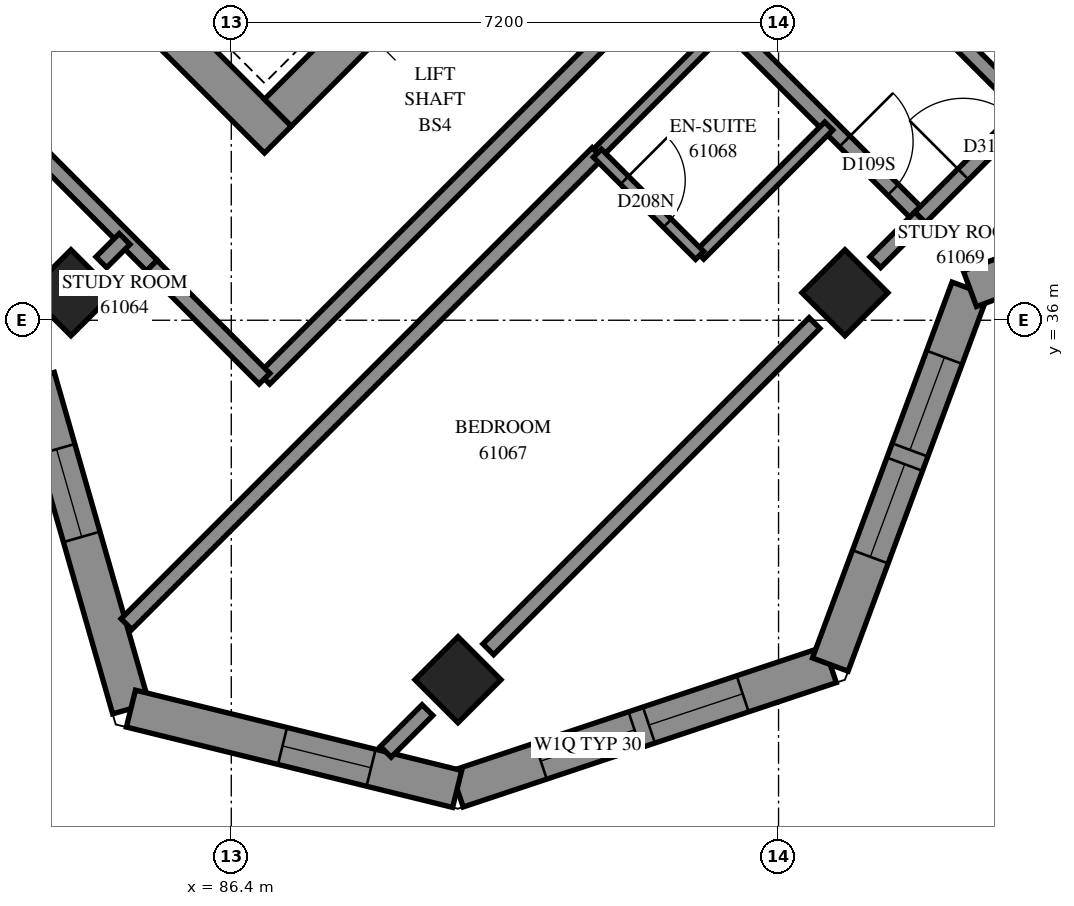
"""IFC4 building model, lengths in metres.
Left out: names, types, materials, properties, quantities, classifications, styles, units other than length and angle.
Written with IfcOpenShell. Run it as: python <this file> out.ifc"""

import sys

from ifc_helpers import new_model, si_unit, direction, frame, frame_2d, origin, origin_2d, place, context, subcontext, project, spatial, polyline, rectangle, outline, extrude, element, fill, save


model = new_model("IFC4")
c1 = context("Model", 3, precision=1e-05, world=origin(), true_north=direction((0.0, 1.0)))
c2 = subcontext(c1, "Body", "Model", "MODEL_VIEW")
j1 = project(units=[si_unit("LENGTHUNIT", "METRE"), si_unit("PLANEANGLEUNIT", "RADIAN")], contexts=[c1])
p1 = place(None, origin())
s1 = spatial("IfcSite", under=j1, at=p1, CompositionType="ELEMENT")
p2 = place(p1, origin())
s2 = spatial("IfcBuilding", under=s1, at=p2, CompositionType="ELEMENT")
p3 = place(p2, frame((0.0, 0.0, 223.6)))
s3 = spatial("IfcBuildingStorey", under=s2, at=p3, CompositionType="ELEMENT", Elevation=223.6)
for number, where, z_axis, x_axis in (
    (1, (84.291, 36.362, 0.0), (0.0, 0.0, 1.0), (0.707, -0.707, 0.0)),
    (2, (94.474, 36.362, 0.0), (0.0, 0.0, 1.0), (0.707, -0.707, 0.0)),
    (3, (89.382, 31.271, 0.0), (0.0, 0.0, 1.0), (0.707, -0.707, 0.0)),
):
    element("IfcColumn", number, at=place(p3, frame(where, z_axis=z_axis, x_axis=x_axis)), inside=s3, PredefinedType="COLUMN", context=c2, shape_type="SweptSolid", body=[
        extrude(rectangle(XDim=0.8, YDim=0.8, at=origin_2d()), origin(), (0.0, 0.0, 1.0), 3.1),
    ])
p4 = place(p3, frame((76.124, 49.267, -0.3), z_axis=(0.0, 0.0, 1.0), x_axis=(0.7071067812, -0.7071067812, 0.0)))
e4 = element("IfcWall", 4, at=p4, inside=s3, PredefinedType="SHEAR", context=c2, shape_type="SweptSolid", body=[
    extrude(rectangle(XDim=15.4, YDim=0.5, at=frame_2d((7.7, 0.0))), origin(), (0.0, 0.0, 1.0), 2.7),
])
p5 = place(p3, frame((87.013, 38.731, -0.3), z_axis=(0.0, 0.0, 1.0), x_axis=(0.7071067812, 0.7071067812, 0.0)))
e5 = element("IfcWall", 5, at=p5, inside=s3, PredefinedType="SHEAR", context=c2, shape_type="SweptSolid", body=[
    extrude(rectangle(XDim=14.4, YDim=0.5, at=frame_2d((7.2, 0.0))), origin(), (0.0, 0.0, 1.0), 2.7),
])
p6 = place(p5, frame((4.55, 0.0, 0.3)))
e6 = element("IfcOpeningElement", 6, at=p6, cuts=e5, PredefinedType="OPENING", context=c2, shape_type="SweptSolid", body=[
    extrude(rectangle(XDim=1.1, YDim=2.1, at=frame_2d((0.55, 1.05))), frame((0.0, 0.26, 0.0), z_axis=(0.0, -1.0, 0.0), x_axis=(1.0, 0.0, 0.0)), (0.0, 0.0, 1.0), 0.52),
])
p7 = place(p5, frame((11.35, 0.0, 0.3)))
e7 = element("IfcOpeningElement", 7, at=p7, cuts=e5, PredefinedType="OPENING", context=c2, shape_type="SweptSolid", body=[
    extrude(rectangle(XDim=1.1, YDim=2.1, at=frame_2d((0.55, 1.05))), frame((0.0, 0.26, 0.0), z_axis=(0.0, -1.0, 0.0), x_axis=(1.0, 0.0, 0.0)), (0.0, 0.0, 1.0), 0.52),
])
p8 = place(p3, frame((89.372, 29.834, 0.0), z_axis=(0.0, 0.0, 1.0), x_axis=(0.9486832981, 0.316227766, 0.0)))
e8 = element("IfcWall", 8, at=p8, inside=s3, PredefinedType="SOLIDWALL", context=c2, shape_type="SweptSolid", body=[
    extrude(outline(polyline([(-0.072, -0.25), (5.294, -0.25), (5.055, 0.25), (0.072, 0.25), (-0.072, -0.25)])), origin(), (0.0, 0.0, 1.0), 3.1),
])
p9 = place(p8, frame((1.159, 0.0, 0.45)))
e9 = element("IfcOpeningElement", 9, at=p9, cuts=e8, PredefinedType="OPENING", context=c2, shape_type="SweptSolid", body=[
    extrude(rectangle(XDim=1.3, YDim=2.5, at=frame_2d((0.65, 1.25))), frame((0.0, 0.26, 0.0), z_axis=(0.0, -1.0, 0.0), x_axis=(1.0, 0.0, 0.0)), (0.0, 0.0, 1.0), 0.52),
])
p10 = place(p8, frame((2.659, 0.0, 0.45)))
e10 = element("IfcOpeningElement", 10, at=p10, cuts=e8, PredefinedType="OPENING", context=c2, shape_type="SweptSolid", body=[
    extrude(rectangle(XDim=1.3, YDim=2.5, at=frame_2d((0.65, 1.25))), frame((0.0, 0.26, 0.0), z_axis=(0.0, -1.0, 0.0), x_axis=(1.0, 0.0, 0.0)), (0.0, 0.0, 1.0), 0.52),
])
p11 = place(p3, frame((94.281, 31.47, 0.0), z_axis=(0.0, 0.0, 1.0), x_axis=(0.3481903374, 0.9374238577, 0.0)))
e11 = element("IfcWall", 11, at=p11, inside=s3, PredefinedType="SOLIDWALL", context=c2, shape_type="SweptSolid", body=[
    extrude(outline(polyline([(-0.12, -0.25), (5.16, -0.25), (5.39, 0.25), (0.12, 0.25), (-0.12, -0.25)])), origin(), (0.0, 0.0, 1.0), 3.1),
])
p12 = place(p11, frame((1.512, 0.0, 0.45)))
e12 = element("IfcOpeningElement", 12, at=p12, cuts=e11, PredefinedType="OPENING", context=c2, shape_type="SweptSolid", body=[
    extrude(rectangle(XDim=1.3, YDim=2.5, at=frame_2d((0.65, 1.25))), frame((0.0, 0.26, 0.0), z_axis=(0.0, -1.0, 0.0), x_axis=(1.0, 0.0, 0.0)), (0.0, 0.0, 1.0), 0.52),
])
p13 = place(p11, frame((3.012, 0.0, 0.45)))
e13 = element("IfcOpeningElement", 13, at=p13, cuts=e11, PredefinedType="OPENING", context=c2, shape_type="SweptSolid", body=[
    extrude(rectangle(XDim=1.3, YDim=2.5, at=frame_2d((0.65, 1.25))), frame((0.0, 0.26, 0.0), z_axis=(0.0, -1.0, 0.0), x_axis=(1.0, 0.0, 0.0)), (0.0, 0.0, 1.0), 0.52),
])
p14 = place(p3, frame((96.118, 36.415, 0.0), z_axis=(0.0, 0.0, 1.0), x_axis=(0.9374238577, 0.3481903374, 0.0)))
e14 = element("IfcWall", 14, at=p14, inside=s3, PredefinedType="SOLIDWALL", context=c2, shape_type="SweptSolid", body=[
    extrude(outline(polyline([(0.115, -0.25), (5.395, -0.25), (5.155, 0.25), (-0.115, 0.25), (0.115, -0.25)])), origin(), (0.0, 0.0, 1.0), 3.1),
])
p15 = place(p14, frame((1.655, 0.0, 0.45)))
e15 = element("IfcOpeningElement", 15, at=p15, cuts=e14, PredefinedType="OPENING", context=c2, shape_type="SweptSolid", body=[
    extrude(rectangle(XDim=1.3, YDim=2.5, at=frame_2d((0.65, 1.25))), frame((0.0, 0.26, 0.0), z_axis=(0.0, -1.0, 0.0), x_axis=(1.0, 0.0, 0.0)), (0.0, 0.0, 1.0), 0.52),
])
p16 = place(p14, frame((3.155, 0.0, 0.45)))
e16 = element("IfcOpeningElement", 16, at=p16, cuts=e14, PredefinedType="OPENING", context=c2, shape_type="SweptSolid", body=[
    extrude(rectangle(XDim=1.3, YDim=2.5, at=frame_2d((0.65, 1.25))), frame((0.0, 0.26, 0.0), z_axis=(0.0, -1.0, 0.0), x_axis=(1.0, 0.0, 0.0)), (0.0, 0.0, 1.0), 0.52),
])
p17 = place(p3, frame((83.831, 35.246, 0.0), z_axis=(0.0, 0.0, 1.0), x_axis=(0.2755517971, -0.9612862254, 0.0)))
e17 = element("IfcWall", 17, at=p17, inside=s3, PredefinedType="SOLIDWALL", context=c2, shape_type="SweptSolid", body=[
    extrude(outline(polyline([(0.139, -0.25), (4.676, -0.25), (4.386, 0.25), (-0.139, 0.25), (0.139, -0.25)])), origin(), (0.0, 0.0, 1.0), 3.1),
])
p18 = place(p17, frame((0.98, 0.0, 0.45)))
e18 = element("IfcOpeningElement", 18, at=p18, cuts=e17, PredefinedType="OPENING", context=c2, shape_type="SweptSolid", body=[
    extrude(rectangle(XDim=1.2, YDim=2.5, at=frame_2d((0.6, 1.25))), frame((0.0, 0.26, 0.0), z_axis=(0.0, -1.0, 0.0), x_axis=(1.0, 0.0, 0.0)), (0.0, 0.0, 1.0), 0.52),
])
p19 = place(p3, frame((85.08, 30.89, 0.0), z_axis=(0.0, 0.0, 1.0), x_axis=(0.9709947618, -0.2391007581, 0.0)))
e19 = element("IfcWall", 19, at=p19, inside=s3, PredefinedType="SOLIDWALL", context=c2, shape_type="SweptSolid", body=[
    extrude(outline(polyline([(-0.145, -0.25), (4.493, -0.25), (4.348, 0.25), (0.145, 0.25), (-0.145, -0.25)])), origin(), (0.0, 0.0, 1.0), 3.1),
])
p20 = place(p19, frame((2.054, 0.0, 0.45)))
e20 = element("IfcOpeningElement", 20, at=p20, cuts=e19, PredefinedType="OPENING", context=c2, shape_type="SweptSolid", body=[
    extrude(rectangle(XDim=1.2, YDim=2.5, at=frame_2d((0.6, 1.25))), frame((0.0, 0.26, 0.0), z_axis=(0.0, -1.0, 0.0), x_axis=(1.0, 0.0, 0.0)), (0.0, 0.0, 1.0), 0.52),
])
p21 = place(p3, frame((85.021, 32.002, 0.0), z_axis=(0.0, 0.0, 1.0), x_axis=(0.7071010771, 0.7071124852, 0.0)))
e21 = element("IfcWall", 21, at=p21, inside=s3, PredefinedType="PARTITIONING", context=c2, shape_type="SweptSolid", body=[
    extrude(rectangle(XDim=8.766, YDim=0.2, at=frame_2d((4.383, 0.0))), origin(), (0.0, 0.0, 1.0), 3.1),
])
p22 = place(p3, frame((86.835, 35.231, 0.0), z_axis=(0.0, 0.0, 1.0), x_axis=(0.7071067812, 0.7071067812, 0.0)))
e22 = element("IfcWall", 22, at=p22, inside=s3, PredefinedType="PARTITIONING", context=c2, shape_type="SweptSolid", body=[
    extrude(rectangle(XDim=7.6, YDim=0.2, at=frame_2d((3.8, 0.0))), origin(), (0.0, 0.0, 1.0), 3.1),
])
p23 = place(p22, frame((6.346, 0.0, 0.0)))
e23 = element("IfcOpeningElement", 23, at=p23, cuts=e22, PredefinedType="OPENING", context=c2, shape_type="SweptSolid", body=[
    extrude(rectangle(XDim=1.0, YDim=2.1, at=frame_2d((0.5, 1.05))), frame((0.0, 0.11, 0.0), z_axis=(0.0, -1.0, 0.0), x_axis=(1.0, 0.0, 0.0)), (0.0, 0.0, 1.0), 0.22),
])
p24 = place(p3, frame((80.522, 41.553, 0.0), z_axis=(0.0, 0.0, 1.0), x_axis=(0.7071067812, -0.7071067812, 0.0)))
e24 = element("IfcWall", 24, at=p24, inside=s3, PredefinedType="PARTITIONING", context=c2, shape_type="SweptSolid", body=[
    extrude(rectangle(XDim=6.836, YDim=0.2, at=frame_2d((3.418, 0.0))), origin(), (0.0, 0.0, 1.0), 3.1),
])
p25 = place(p3, frame((89.781, 31.671, 0.0), z_axis=(0.0, 0.0, 1.0), x_axis=(0.7071067812, 0.7071067812, 0.0)))
e25 = element("IfcWall", 25, at=p25, inside=s3, PredefinedType="PARTITIONING", context=c2, shape_type="SweptSolid", body=[
    extrude(rectangle(XDim=6.07, YDim=0.2, at=frame_2d((3.035, 0.0))), origin(), (0.0, 0.0, 1.0), 2.6),
])
p26 = place(p3, frame((93.623, 42.015, 0.0), z_axis=(0.0, 0.0, 1.0), x_axis=(0.7071067812, -0.7071067812, 0.0)))
e26 = element("IfcWall", 26, at=p26, inside=s3, PredefinedType="PARTITIONING", context=c2, shape_type="SweptSolid", body=[
    extrude(rectangle(XDim=4.599, YDim=0.2, at=frame_2d((2.3, 0.0))), origin(), (0.0, 0.0, 1.0), 3.1),
])
p27 = place(p26, frame((1.349, 0.0, 0.0)))
e27 = element("IfcOpeningElement", 27, at=p27, cuts=e26, PredefinedType="OPENING", context=c2, shape_type="SweptSolid", body=[
    extrude(rectangle(XDim=0.9, YDim=2.1, at=frame_2d((0.45, 1.05))), frame((0.0, 0.11, 0.0), z_axis=(0.0, -1.0, 0.0), x_axis=(1.0, 0.0, 0.0)), (0.0, 0.0, 1.0), 0.22),
])
p28 = place(p3, frame((92.216, 40.608, 0.0), z_axis=(0.0, 0.0, 1.0), x_axis=(0.7071067812, -0.7071067812, 0.0)))
e28 = element("IfcWall", 28, at=p28, inside=s3, PredefinedType="PARTITIONING", context=c2, shape_type="SweptSolid", body=[
    extrude(rectangle(XDim=4.599, YDim=0.2, at=frame_2d((2.3, 0.0))), origin(), (0.0, 0.0, 1.0), 3.1),
])
p29 = place(p28, frame((3.189, 0.0, 0.0)))
e29 = element("IfcOpeningElement", 29, at=p29, cuts=e28, PredefinedType="OPENING", context=c2, shape_type="SweptSolid", body=[
    extrude(rectangle(XDim=0.9, YDim=2.1, at=frame_2d((0.45, 1.05))), frame((0.0, 0.11, 0.0), z_axis=(0.0, -1.0, 0.0), x_axis=(1.0, 0.0, 0.0)), (0.0, 0.0, 1.0), 0.22),
])
for number, where, z_axis, x_axis in (
    (30, (92.563, 36.857, 0.0), (0.0, 0.0, 1.0), (0.707, 0.707, 0.0)),
    (31, (91.219, 38.201, 0.0), (0.0, 0.0, 1.0), (0.707, 0.707, 0.0)),
):
    element("IfcWall", number, at=place(p3, frame(where, z_axis=z_axis, x_axis=x_axis)), inside=s3, PredefinedType="PARTITIONING", context=c2, shape_type="SweptSolid", body=[
        extrude(rectangle(XDim=2.401, YDim=0.15, at=frame_2d((1.201, 0.0))), origin(), (0.0, 0.0, 1.0), 3.1),
    ])
p30 = place(p3, frame((85.353, 36.717, 0.0), z_axis=(0.0, 0.0, 1.0), x_axis=(0.7066304548, -0.7075827869, 0.0)))
e32 = element("IfcWall", 32, at=p30, inside=s3, PredefinedType="PARTITIONING", context=c2, shape_type="SweptSolid", body=[
    extrude(rectangle(XDim=2.1, YDim=0.2, at=frame_2d((1.05, 0.0))), origin(), (0.0, 0.0, 1.0), 3.1),
])
p31 = place(p3, frame((95.463, 37.353, 0.0), z_axis=(0.0, 0.0, 1.0), x_axis=(0.7071067812, 0.7071067812, 0.0)))
e33 = element("IfcWall", 33, at=p31, inside=s3, PredefinedType="PARTITIONING", context=c2, shape_type="SweptSolid", body=[
    extrude(rectangle(XDim=2.0, YDim=0.2, at=frame_2d((1.0, 0.0))), origin(), (0.0, 0.0, 1.0), 2.6),
])
p32 = place(p31, frame((0.802, 0.0, 0.0)))
e34 = element("IfcOpeningElement", 34, at=p32, cuts=e33, PredefinedType="OPENING", context=c2, shape_type="SweptSolid", body=[
    extrude(rectangle(XDim=1.0, YDim=2.1, at=frame_2d((0.5, 1.05))), frame((0.0, 0.11, 0.0), z_axis=(0.0, -1.0, 0.0), x_axis=(1.0, 0.0, 0.0)), (0.0, 0.0, 1.0), 0.22),
])
p33 = place(p3, frame((91.217, 38.197, 0.0), z_axis=(0.0, 0.0, 1.0), x_axis=(0.7071067812, -0.7071067812, 0.0)))
e35 = element("IfcWall", 35, at=p33, inside=s3, PredefinedType="PARTITIONING", context=c2, shape_type="SweptSolid", body=[
    extrude(rectangle(XDim=1.901, YDim=0.15, at=frame_2d((0.95, 0.0))), origin(), (0.0, 0.0, 1.0), 3.1),
])
p34 = place(p33, frame((0.502, 0.0, 0.0)))
e36 = element("IfcOpeningElement", 36, at=p34, cuts=e35, PredefinedType="OPENING", context=c2, shape_type="SweptSolid", body=[
    extrude(rectangle(XDim=0.8, YDim=2.1, at=frame_2d((0.4, 1.05))), frame((0.0, 0.085, 0.0), z_axis=(0.0, -1.0, 0.0), x_axis=(1.0, 0.0, 0.0)), (0.0, 0.0, 1.0), 0.17),
])
p35 = place(p3, frame((94.873, 36.763, 0.0), z_axis=(0.0, 0.0, 1.0), x_axis=(0.7071067812, 0.7071067812, 0.0)))
e37 = element("IfcWall", 37, at=p35, inside=s3, PredefinedType="PARTITIONING", context=c2, shape_type="SweptSolid", body=[
    extrude(rectangle(XDim=0.834, YDim=0.2, at=frame_2d((0.417, 0.0))), origin(), (0.0, 0.0, 1.0), 2.6),
])
p36 = place(p3, frame((88.433, 30.322, 0.0), z_axis=(0.0, 0.0, 1.0), x_axis=(0.7070423259, 0.7071712306, 0.0)))
e38 = element("IfcWall", 38, at=p36, inside=s3, PredefinedType="PARTITIONING", context=c2, shape_type="SweptSolid", body=[
    extrude(rectangle(XDim=0.776, YDim=0.2, at=frame_2d((0.388, 0.0))), origin(), (0.0, 0.0, 1.0), 3.1),
])
p37 = place(p3, frame((84.691, 36.763, 0.0), z_axis=(0.0, 0.0, 1.0), x_axis=(0.7071067812, 0.7071067812, 0.0)))
e39 = element("IfcWall", 39, at=p37, inside=s3, PredefinedType="PARTITIONING", context=c2, shape_type="SweptSolid", body=[
    extrude(rectangle(XDim=0.433, YDim=0.2, at=frame_2d((0.216, 0.0))), origin(), (0.0, 0.0, 1.0), 3.1),
])
p38 = place(p9, origin())
e40 = element("IfcWindow", 40, at=p38, inside=s3, PartitioningType="SINGLE_PANEL", PredefinedType="WINDOW", context=c2, shape_type="SweptSolid", body=[
    extrude(rectangle(XDim=1.3, YDim=2.5, at=frame_2d((0.65, 1.25))), frame((0.0, 0.18, 0.0), z_axis=(0.0, -1.0, 0.0), x_axis=(1.0, 0.0, 0.0)), (0.0, 0.0, 1.0), 0.06),
])
fill(e9, e40)
p39 = place(p10, origin())
e41 = element("IfcWindow", 41, at=p39, inside=s3, PartitioningType="SINGLE_PANEL", PredefinedType="WINDOW", context=c2, shape_type="SweptSolid", body=[
    extrude(rectangle(XDim=1.3, YDim=2.5, at=frame_2d((0.65, 1.25))), frame((0.0, 0.18, 0.0), z_axis=(0.0, -1.0, 0.0), x_axis=(1.0, 0.0, 0.0)), (0.0, 0.0, 1.0), 0.06),
])
fill(e10, e41)
p40 = place(p12, origin())
e42 = element("IfcWindow", 42, at=p40, inside=s3, PartitioningType="SINGLE_PANEL", PredefinedType="WINDOW", context=c2, shape_type="SweptSolid", body=[
    extrude(rectangle(XDim=1.3, YDim=2.5, at=frame_2d((0.65, 1.25))), frame((0.0, 0.18, 0.0), z_axis=(0.0, -1.0, 0.0), x_axis=(1.0, 0.0, 0.0)), (0.0, 0.0, 1.0), 0.06),
])
fill(e12, e42)
p41 = place(p13, origin())
e43 = element("IfcWindow", 43, at=p41, inside=s3, PartitioningType="SINGLE_PANEL", PredefinedType="WINDOW", context=c2, shape_type="SweptSolid", body=[
    extrude(rectangle(XDim=1.3, YDim=2.5, at=frame_2d((0.65, 1.25))), frame((0.0, 0.18, 0.0), z_axis=(0.0, -1.0, 0.0), x_axis=(1.0, 0.0, 0.0)), (0.0, 0.0, 1.0), 0.06),
])
fill(e13, e43)
p42 = place(p18, origin())
e44 = element("IfcWindow", 44, at=p42, inside=s3, PartitioningType="SINGLE_PANEL", PredefinedType="WINDOW", context=c2, shape_type="SweptSolid", body=[
    extrude(rectangle(XDim=1.2, YDim=2.5, at=frame_2d((0.6, 1.25))), frame((0.0, 0.18, 0.0), z_axis=(0.0, -1.0, 0.0), x_axis=(1.0, 0.0, 0.0)), (0.0, 0.0, 1.0), 0.06),
])
fill(e18, e44)
p43 = place(p20, origin())
e45 = element("IfcWindow", 45, at=p43, inside=s3, PartitioningType="SINGLE_PANEL", PredefinedType="WINDOW", context=c2, shape_type="SweptSolid", body=[
    extrude(rectangle(XDim=1.2, YDim=2.5, at=frame_2d((0.6, 1.25))), frame((0.0, 0.18, 0.0), z_axis=(0.0, -1.0, 0.0), x_axis=(1.0, 0.0, 0.0)), (0.0, 0.0, 1.0), 0.06),
])
fill(e20, e45)
p44 = place(p29, origin())
e46 = element("IfcDoor", 46, at=p44, inside=s3, OperationType="SINGLE_SWING_LEFT", PredefinedType="DOOR", context=c2, shape_type="SweptSolid", body=[
    extrude(rectangle(XDim=0.9, YDim=2.1, at=frame_2d((0.45, 1.05))), frame((0.0, 0.025, 0.0), z_axis=(0.0, -1.0, 0.0), x_axis=(1.0, 0.0, 0.0)), (0.0, 0.0, 1.0), 0.05),
])
fill(e29, e46)
p45 = place(p34, origin())
e47 = element("IfcDoor", 47, at=p45, inside=s3, OperationType="SINGLE_SWING_RIGHT", PredefinedType="DOOR", context=c2, shape_type="SweptSolid", body=[
    extrude(rectangle(XDim=0.8, YDim=2.1, at=frame_2d((0.4, 1.05))), frame((0.0, 0.025, 0.0), z_axis=(0.0, -1.0, 0.0), x_axis=(1.0, 0.0, 0.0)), (0.0, 0.0, 1.0), 0.05),
])
fill(e36, e47)
p46 = place(p32, origin())
e48 = element("IfcDoor", 48, at=p46, inside=s3, OperationType="SINGLE_SWING_RIGHT", PredefinedType="DOOR", context=c2, shape_type="SweptSolid", body=[
    extrude(rectangle(XDim=1.0, YDim=2.1, at=frame_2d((0.5, 1.05))), frame((0.0, 0.025, 0.0), z_axis=(0.0, -1.0, 0.0), x_axis=(1.0, 0.0, 0.0)), (0.0, 0.0, 1.0), 0.05),
])
fill(e34, e48)
save(model, sys.argv[1])
